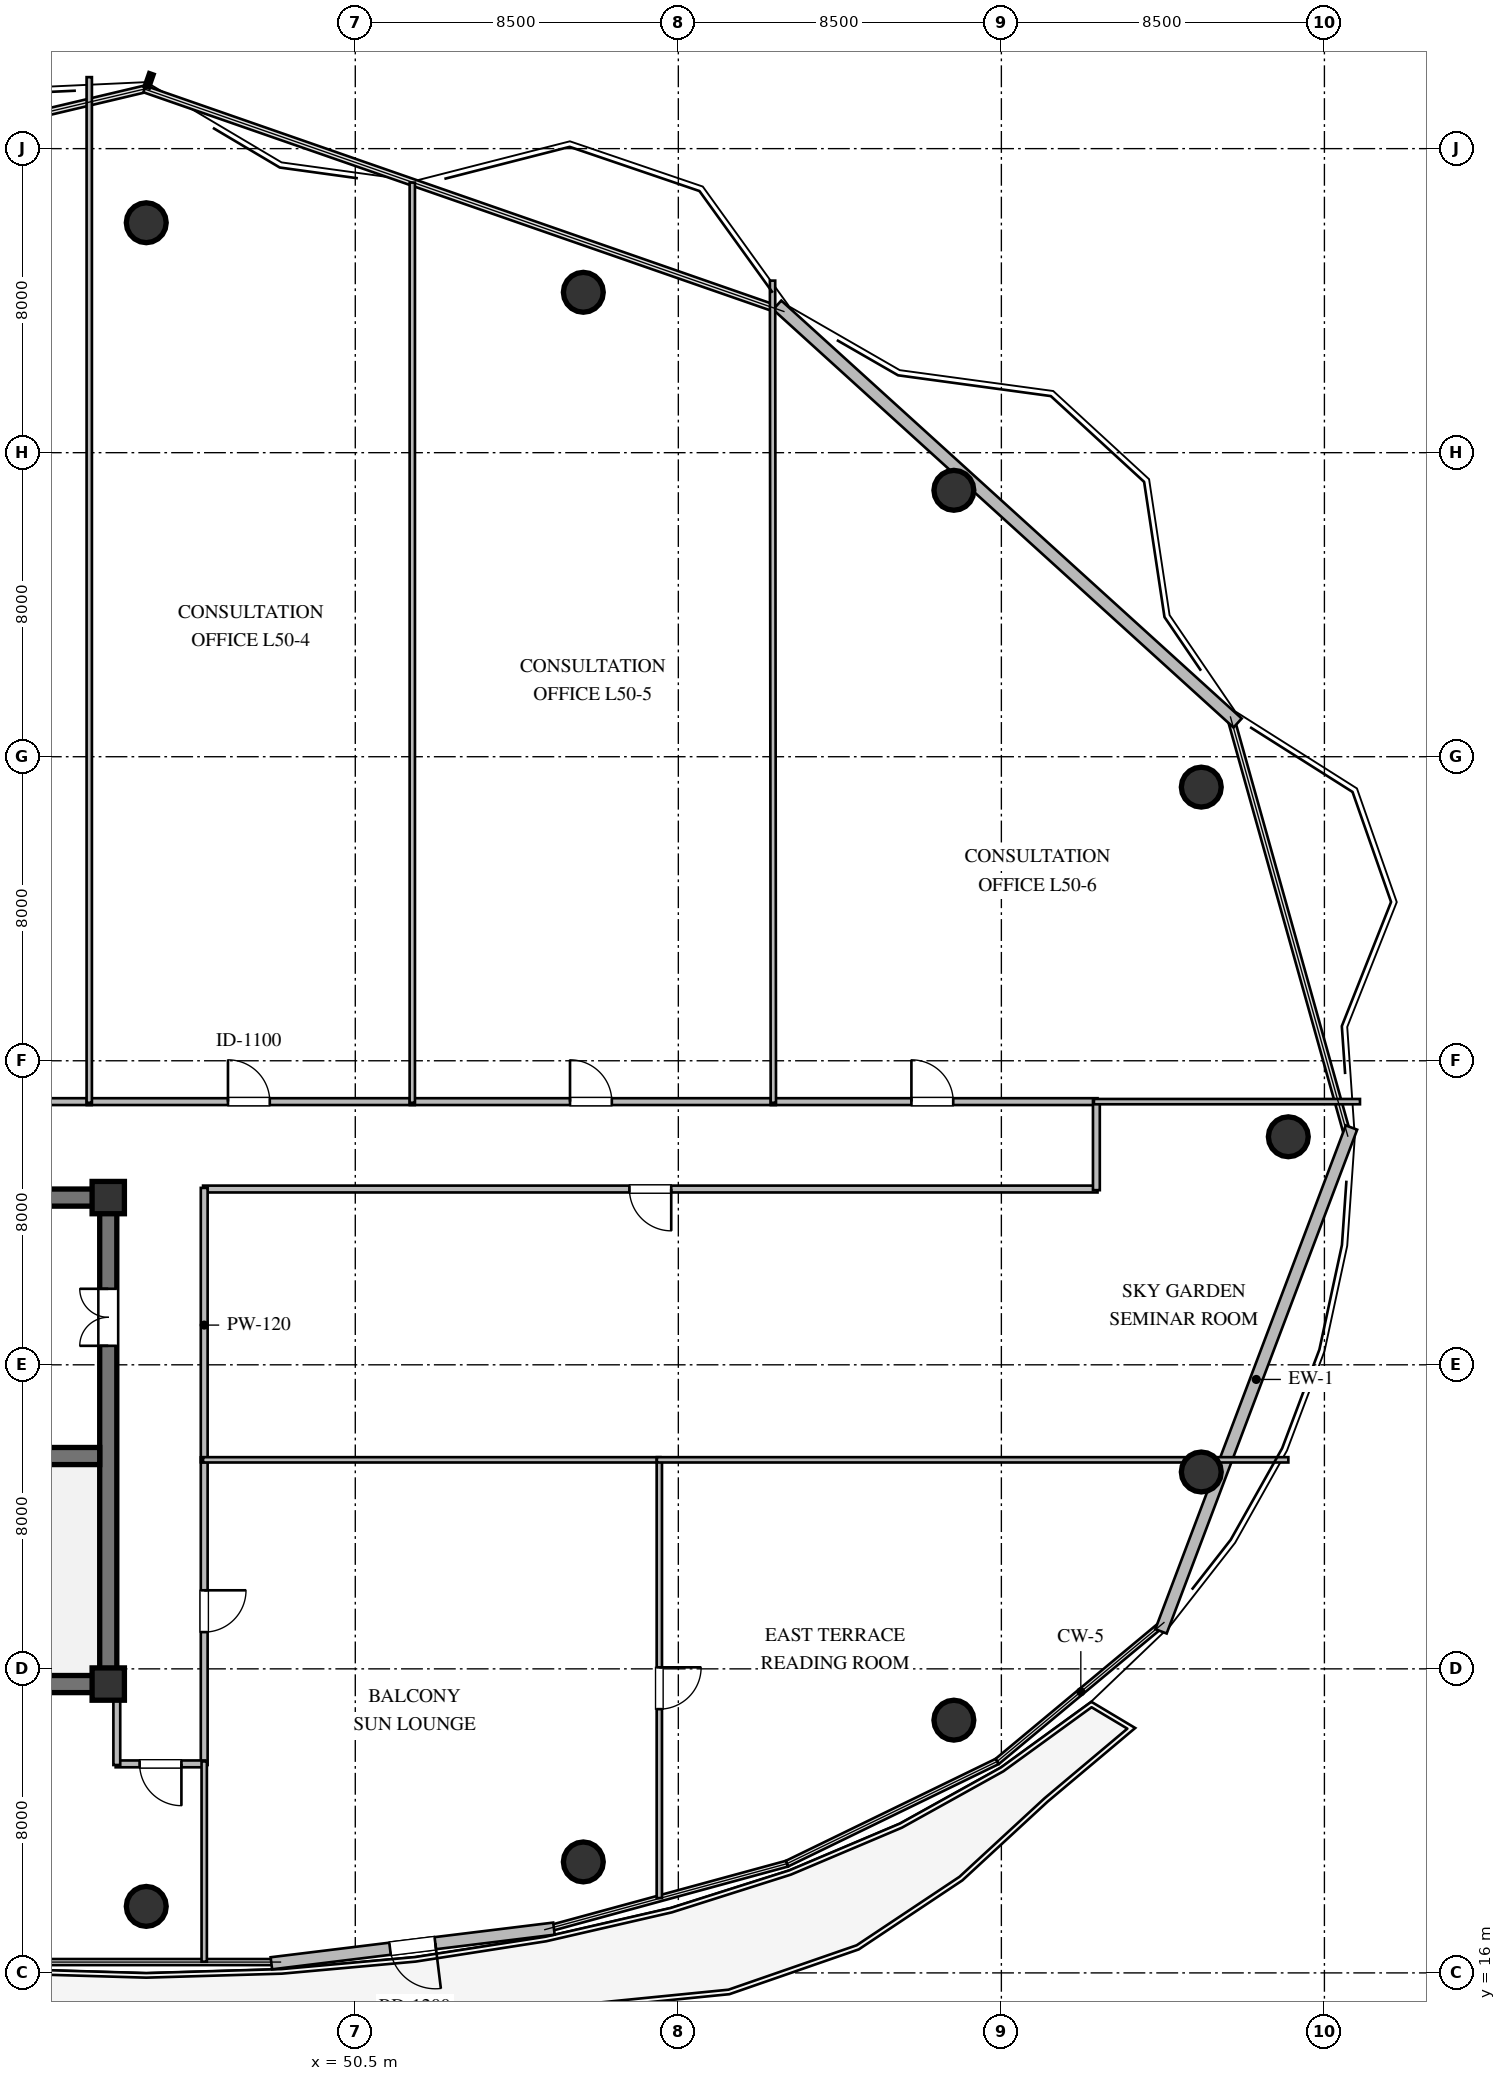
"""IFC4 building model, lengths in metres.
Left out: names, types, materials, properties, quantities, classifications, styles, units other than length and angle.
Written with IfcOpenShell. Run it as: python <this file> out.ifc"""

import sys

from ifc_helpers import new_model, si_unit, direction, frame, frame_2d, origin, origin_2d, place, context, subcontext, project, spatial, rectangle, circle, extrude, element, fill, save


model = new_model("IFC4")
c1 = context("Model", 3, precision=1e-05, world=origin(), true_north=direction((0.0, 1.0)))
c2 = subcontext(c1, "Body", "Model", "MODEL_VIEW")
j1 = project(units=[si_unit("LENGTHUNIT", "METRE"), si_unit("PLANEANGLEUNIT", "RADIAN")], contexts=[c1])
p1 = place(None, origin())
s1 = spatial("IfcSite", under=j1, at=p1, CompositionType="ELEMENT")
p2 = place(p1, origin())
s2 = spatial("IfcBuilding", under=s1, at=p2, CompositionType="ELEMENT")
p3 = place(p2, frame((0.0, 0.0, 190.8)))
s3 = spatial("IfcBuildingStorey", under=s2, at=p3, CompositionType="ELEMENT", Elevation=190.8)
for number, where, z_axis, x_axis in (
    (1, (21.775, 23.6, 0.0), (0.0, 0.0, 1.0), (1.0, 0.0, 0.0)),
    (2, (21.775, 36.4, 0.0), (0.0, 0.0, 1.0), (1.0, 0.0, 0.0)),
):
    element("IfcWall", number, at=place(p3, frame(where, z_axis=z_axis, x_axis=x_axis)), inside=s3, PredefinedType="SHEAR", context=c2, shape_type="SweptSolid", body=[
        extrude(rectangle(XDim=22.45, YDim=0.45, at=frame_2d((11.225, 0.0))), origin(), (0.0, 0.0, 1.0), 4.56),
    ])
p4 = place(p3, frame((44.0, 23.825, 0.0), z_axis=(0.0, 0.0, 1.0), x_axis=(0.0, 1.0, 0.0)))
e3 = element("IfcWall", 3, at=p4, inside=s3, PredefinedType="SHEAR", context=c2, shape_type="SweptSolid", body=[
    extrude(rectangle(XDim=12.35, YDim=0.45, at=frame_2d((6.175, 0.0))), origin(), (0.0, 0.0, 1.0), 4.56),
])
p5 = place(p4, frame((8.675, 0.0, 0.0)))
e4 = element("IfcOpeningElement", 4, at=p5, cuts=e3, PredefinedType="OPENING", context=c2, shape_type="SweptSolid", body=[
    extrude(rectangle(XDim=1.5, YDim=2.15, at=frame_2d((0.75, 1.075))), frame((0.0, 0.235, 0.0), z_axis=(0.0, -1.0, 0.0), x_axis=(1.0, 0.0, 0.0)), (0.0, 0.0, 1.0), 0.47),
])
p6 = place(p3, frame((22.225, 29.6, 0.0), z_axis=(0.0, 0.0, 1.0), x_axis=(1.0, 0.0, 0.0)))
e5 = element("IfcWall", 5, at=p6, inside=s3, PredefinedType="SHEAR", context=c2, shape_type="SweptSolid", body=[
    extrude(rectangle(XDim=21.55, YDim=0.45, at=frame_2d((10.775, 0.0))), origin(), (0.0, 0.0, 1.0), 4.56),
])
p7 = place(p6, frame((12.225, 0.0, 0.0)))
e6 = element("IfcOpeningElement", 6, at=p7, cuts=e5, PredefinedType="OPENING", context=c2, shape_type="SweptSolid", body=[
    extrude(rectangle(XDim=1.15, YDim=2.1, at=frame_2d((0.575, 1.05))), frame((0.0, 0.235, 0.0), z_axis=(0.0, -1.0, 0.0), x_axis=(1.0, 0.0, 0.0)), (0.0, 0.0, 1.0), 0.47),
])
for number, where, z_axis, x_axis in (
    (7, (44.0, 23.6, 0.0), (0.0, 0.0, 1.0), (1.0, 0.0, 0.0)),
    (8, (44.0, 36.4, 0.0), (0.0, 0.0, 1.0), (1.0, 0.0, 0.0)),
):
    element("IfcColumn", number, at=place(p3, frame(where, z_axis=z_axis, x_axis=x_axis)), inside=s3, PredefinedType="COLUMN", context=c2, shape_type="SweptSolid", body=[
        extrude(rectangle(XDim=0.85, YDim=0.85, at=origin_2d()), origin(), (0.0, 0.0, 1.0), 4.8),
    ])
for number, where, z_axis, x_axis in (
    (9, (75.05, 38.0, 0.0), (0.0, 0.0, 1.0), (1.0, 0.0, 0.0)),
    (10, (72.76, 47.2, 0.0), (0.0, 0.0, 1.0), (1.0, 0.0, 0.0)),
    (11, (66.25, 55.01, 0.0), (0.0, 0.0, 1.0), (1.0, 0.0, 0.0)),
    (12, (56.5, 60.22, 0.0), (0.0, 0.0, 1.0), (1.0, 0.0, 0.0)),
    (13, (45.0, 62.05, 0.0), (0.0, 0.0, 1.0), (1.0, 0.0, 0.0)),
    (14, (45.0, 17.75, 0.0), (0.0, 0.0, 1.0), (1.0, 0.0, 0.0)),
    (15, (56.5, 18.92, 0.0), (0.0, 0.0, 1.0), (1.0, 0.0, 0.0)),
    (16, (66.25, 22.65, 0.0), (0.0, 0.0, 1.0), (1.0, 0.0, 0.0)),
    (17, (72.76, 29.18, 0.0), (0.0, 0.0, 1.0), (1.0, 0.0, 0.0)),
):
    element("IfcColumn", number, at=place(p3, frame(where, z_axis=z_axis, x_axis=x_axis)), inside=s3, PredefinedType="COLUMN", context=c2, shape_type="SweptSolid", body=[
        extrude(circle(Radius=0.525, at=origin_2d()), origin(), (0.0, 0.0, 1.0), 4.8),
    ])
p8 = place(p3, frame((76.712, 38.243, 0.0), z_axis=(0.0, 0.0, 1.0), x_axis=(-0.353659523244, -0.935374225441, 0.0)))
e18 = element("IfcWall", 18, at=p8, inside=s3, PredefinedType="STANDARD", context=c2, shape_type="SweptSolid", body=[
    extrude(rectangle(XDim=14.172, YDim=0.32, at=frame_2d((7.086, 0.0))), origin(), (0.0, 0.0, 1.0), 4.56),
])
p9 = place(p3, frame((55.727, 17.165, 0.0), z_axis=(0.0, 0.0, 1.0), x_axis=(-0.992559081031, -0.121763995755, 0.0)))
e19 = element("IfcWall", 19, at=p9, inside=s3, PredefinedType="STANDARD", context=c2, shape_type="SweptSolid", body=[
    extrude(rectangle(XDim=7.491, YDim=0.32, at=frame_2d((3.745, 0.0))), origin(), (0.0, 0.0, 1.0), 4.56),
])
p10 = place(p9, frame((3.145, 0.0, 0.0)))
e20 = element("IfcOpeningElement", 20, at=p10, cuts=e19, PredefinedType="OPENING", context=c2, shape_type="SweptSolid", body=[
    extrude(rectangle(XDim=1.2, YDim=2.15, at=frame_2d((0.6, 1.075))), frame((0.0, 0.17, 0.0), z_axis=(0.0, -1.0, 0.0), x_axis=(1.0, 0.0, 0.0)), (0.0, 0.0, 1.0), 0.34),
])
p11 = place(p3, frame((61.602, 59.884, 0.0), z_axis=(0.0, 0.0, 1.0), x_axis=(0.740416582554, -0.672148260638, 0.0)))
e21 = element("IfcWall", 21, at=p11, inside=s3, PredefinedType="STANDARD", context=c2, shape_type="SweptSolid", body=[
    extrude(rectangle(XDim=16.361, YDim=0.32, at=frame_2d((8.181, 0.0))), origin(), (0.0, 0.0, 1.0), 4.56),
])
p12 = place(p3, frame((34.935, 38.925, 0.0), z_axis=(0.0, 0.0, 1.0), x_axis=(1.0, 0.0, 0.0)))
e22 = element("IfcWall", 22, at=p12, inside=s3, PredefinedType="PARTITIONING", context=c2, shape_type="SweptSolid", body=[
    extrude(rectangle(XDim=8.63, YDim=0.18, at=frame_2d((4.315, 0.0))), origin(), (0.0, 0.0, 1.0), 4.56),
])
p13 = place(p12, frame((3.715, 0.0, 0.0)))
e23 = element("IfcOpeningElement", 23, at=p13, cuts=e22, PredefinedType="OPENING", context=c2, shape_type="SweptSolid", body=[
    extrude(rectangle(XDim=1.1, YDim=2.1, at=frame_2d((0.55, 1.05))), frame((0.0, 0.1, 0.0), z_axis=(0.0, -1.0, 0.0), x_axis=(1.0, 0.0, 0.0)), (0.0, 0.0, 1.0), 0.2),
])
p14 = place(p3, frame((43.435, 38.925, 0.0), z_axis=(0.0, 0.0, 1.0), x_axis=(1.0, 0.0, 0.0)))
e24 = element("IfcWall", 24, at=p14, inside=s3, PredefinedType="PARTITIONING", context=c2, shape_type="SweptSolid", body=[
    extrude(rectangle(XDim=8.63, YDim=0.18, at=frame_2d((4.315, 0.0))), origin(), (0.0, 0.0, 1.0), 4.56),
])
p15 = place(p14, frame((3.715, 0.0, 0.0)))
e25 = element("IfcOpeningElement", 25, at=p15, cuts=e24, PredefinedType="OPENING", context=c2, shape_type="SweptSolid", body=[
    extrude(rectangle(XDim=1.1, YDim=2.1, at=frame_2d((0.55, 1.05))), frame((0.0, 0.1, 0.0), z_axis=(0.0, -1.0, 0.0), x_axis=(1.0, 0.0, 0.0)), (0.0, 0.0, 1.0), 0.2),
])
p16 = place(p3, frame((51.935, 38.925, 0.0), z_axis=(0.0, 0.0, 1.0), x_axis=(1.0, 0.0, 0.0)))
e26 = element("IfcWall", 26, at=p16, inside=s3, PredefinedType="PARTITIONING", context=c2, shape_type="SweptSolid", body=[
    extrude(rectangle(XDim=9.63, YDim=0.18, at=frame_2d((4.815, 0.0))), origin(), (0.0, 0.0, 1.0), 4.56),
])
p17 = place(p16, frame((4.215, 0.0, 0.0)))
e27 = element("IfcOpeningElement", 27, at=p17, cuts=e26, PredefinedType="OPENING", context=c2, shape_type="SweptSolid", body=[
    extrude(rectangle(XDim=1.1, YDim=2.1, at=frame_2d((0.55, 1.05))), frame((0.0, 0.1, 0.0), z_axis=(0.0, -1.0, 0.0), x_axis=(1.0, 0.0, 0.0)), (0.0, 0.0, 1.0), 0.2),
])
p18 = place(p3, frame((61.435, 38.925, 0.0), z_axis=(0.0, 0.0, 1.0), x_axis=(1.0, 0.0, 0.0)))
e28 = element("IfcWall", 28, at=p18, inside=s3, PredefinedType="PARTITIONING", context=c2, shape_type="SweptSolid", body=[
    extrude(rectangle(XDim=8.595, YDim=0.18, at=frame_2d((4.297, 0.0))), origin(), (0.0, 0.0, 1.0), 4.56),
])
p19 = place(p18, frame((3.698, 0.0, 0.0)))
e29 = element("IfcOpeningElement", 29, at=p19, cuts=e28, PredefinedType="OPENING", context=c2, shape_type="SweptSolid", body=[
    extrude(rectangle(XDim=1.1, YDim=2.1, at=frame_2d((0.55, 1.05))), frame((0.0, 0.1, 0.0), z_axis=(0.0, -1.0, 0.0), x_axis=(1.0, 0.0, 0.0)), (0.0, 0.0, 1.0), 0.2),
])
p20 = place(p3, frame((46.525, 29.565, 0.0), z_axis=(0.0, 0.0, 1.0), x_axis=(0.0, -1.0, 0.0)))
e30 = element("IfcWall", 30, at=p20, inside=s3, PredefinedType="PARTITIONING", context=c2, shape_type="SweptSolid", body=[
    extrude(rectangle(XDim=8.095, YDim=0.18, at=frame_2d((4.047, 0.0))), origin(), (0.0, 0.0, 1.0), 4.56),
])
p21 = place(p20, frame((3.498, 0.0, 0.0)))
e31 = element("IfcOpeningElement", 31, at=p21, cuts=e30, PredefinedType="OPENING", context=c2, shape_type="SweptSolid", body=[
    extrude(rectangle(XDim=1.1, YDim=2.1, at=frame_2d((0.55, 1.05))), frame((0.0, 0.1, 0.0), z_axis=(0.0, -1.0, 0.0), x_axis=(1.0, 0.0, 0.0)), (0.0, 0.0, 1.0), 0.2),
])
p22 = place(p3, frame((70.03, 36.625, 0.0), z_axis=(0.0, 0.0, 1.0), x_axis=(-1.0, 0.0, 0.0)))
e32 = element("IfcWall", 32, at=p22, inside=s3, PredefinedType="PARTITIONING", context=c2, shape_type="SweptSolid", body=[
    extrude(rectangle(XDim=23.535, YDim=0.18, at=frame_2d((11.768, 0.0))), origin(), (0.0, 0.0, 1.0), 4.006),
])
p23 = place(p22, frame((11.217, 0.0, 0.0)))
e33 = element("IfcOpeningElement", 33, at=p23, cuts=e32, PredefinedType="OPENING", context=c2, shape_type="SweptSolid", body=[
    extrude(rectangle(XDim=1.1, YDim=2.1, at=frame_2d((0.55, 1.05))), frame((0.0, 0.1, 0.0), z_axis=(0.0, -1.0, 0.0), x_axis=(1.0, 0.0, 0.0)), (0.0, 0.0, 1.0), 0.2),
])
p24 = place(p3, frame((46.525, 36.655, 0.0), z_axis=(0.0, 0.0, 1.0), x_axis=(0.0, -1.0, 0.0)))
e34 = element("IfcWall", 34, at=p24, inside=s3, PredefinedType="PARTITIONING", context=c2, shape_type="SweptSolid", body=[
    extrude(rectangle(XDim=7.22, YDim=0.18, at=frame_2d((3.61, 0.0))), origin(), (0.0, 0.0, 1.0), 4.56),
])
p25 = place(p3, frame((70.0, 38.955, 0.0), z_axis=(0.0, 0.0, 1.0), x_axis=(0.0, -1.0, 0.0)))
e35 = element("IfcWall", 35, at=p25, inside=s3, PredefinedType="PARTITIONING", context=c2, shape_type="SweptSolid", body=[
    extrude(rectangle(XDim=2.36, YDim=0.18, at=frame_2d((1.18, 0.0))), origin(), (0.0, 0.0, 1.0), 4.56),
])
p26 = place(p3, frame((46.555, 21.5, 0.0), z_axis=(0.0, 0.0, 1.0), x_axis=(-1.0, 0.0, 0.0)))
e36 = element("IfcWall", 36, at=p26, inside=s3, PredefinedType="PARTITIONING", context=c2, shape_type="SweptSolid", body=[
    extrude(rectangle(XDim=2.36, YDim=0.18, at=frame_2d((1.18, 0.0))), origin(), (0.0, 0.0, 1.0), 4.56),
])
p27 = place(p26, frame((0.63, 0.0, 0.0)))
e37 = element("IfcOpeningElement", 37, at=p27, cuts=e36, PredefinedType="OPENING", context=c2, shape_type="SweptSolid", body=[
    extrude(rectangle(XDim=1.1, YDim=2.1, at=frame_2d((0.55, 1.05))), frame((0.0, 0.1, 0.0), z_axis=(0.0, -1.0, 0.0), x_axis=(1.0, 0.0, 0.0)), (0.0, 0.0, 1.0), 0.2),
])
p28 = place(p3, frame((44.225, 21.47, 0.0), z_axis=(0.0, 0.0, 1.0), x_axis=(0.0, 1.0, 0.0)))
e38 = element("IfcWall", 38, at=p28, inside=s3, PredefinedType="PARTITIONING", context=c2, shape_type="SweptSolid", body=[
    extrude(rectangle(XDim=2.12, YDim=0.18, at=frame_2d((1.06, 0.0))), origin(), (0.0, 0.0, 1.0), 3.7),
])
p29 = place(p3, frame((43.5, 65.881, 0.0), z_axis=(0.0, 0.0, 1.0), x_axis=(0.0, -1.0, 0.0)))
e39 = element("IfcWall", 39, at=p29, inside=s3, PredefinedType="PARTITIONING", context=c2, shape_type="SweptSolid", body=[
    extrude(rectangle(XDim=26.986, YDim=0.14, at=frame_2d((13.493, 0.0))), origin(), (0.0, 0.0, 1.0), 4.006),
])
p30 = place(p3, frame((52.0, 63.107, 0.0), z_axis=(0.0, 0.0, 1.0), x_axis=(0.0, -1.0, 0.0)))
e40 = element("IfcWall", 40, at=p30, inside=s3, PredefinedType="PARTITIONING", context=c2, shape_type="SweptSolid", body=[
    extrude(rectangle(XDim=24.212, YDim=0.14, at=frame_2d((12.106, 0.0))), origin(), (0.0, 0.0, 1.0), 4.56),
])
p31 = place(p3, frame((61.479, 60.527, 0.0), z_axis=(0.0, 0.0, 1.0), x_axis=(0.000970599396, -0.999999528968, 0.0)))
e41 = element("IfcWall", 41, at=p31, inside=s3, PredefinedType="PARTITIONING", context=c2, shape_type="SweptSolid", body=[
    extrude(rectangle(XDim=21.632, YDim=0.14, at=frame_2d((10.816, 0.0))), origin(), (0.0, 0.0, 1.0), 4.56),
])
p32 = place(p3, frame((76.936, 38.925, 0.0), z_axis=(0.0, 0.0, 1.0), x_axis=(-1.0, 0.0, 0.0)))
e42 = element("IfcWall", 42, at=p32, inside=s3, PredefinedType="PARTITIONING", context=c2, shape_type="SweptSolid", body=[
    extrude(rectangle(XDim=7.001, YDim=0.14, at=frame_2d((3.5, 0.0))), origin(), (0.0, 0.0, 1.0), 4.56),
])
p33 = place(p3, frame((46.495, 29.5, 0.0), z_axis=(0.0, 0.0, 1.0), x_axis=(1.0, 0.0, 0.0)))
e43 = element("IfcWall", 43, at=p33, inside=s3, PredefinedType="PARTITIONING", context=c2, shape_type="SweptSolid", body=[
    extrude(rectangle(XDim=12.035, YDim=0.14, at=frame_2d((6.018, 0.0))), origin(), (0.0, 0.0, 1.0), 4.56),
])
p34 = place(p3, frame((58.5, 29.53, 0.0), z_axis=(0.0, 0.0, 1.0), x_axis=(0.0, -1.0, 0.0)))
e44 = element("IfcWall", 44, at=p34, inside=s3, PredefinedType="PARTITIONING", context=c2, shape_type="SweptSolid", body=[
    extrude(rectangle(XDim=11.561, YDim=0.14, at=frame_2d((5.781, 0.0))), origin(), (0.0, 0.0, 1.0), 4.56),
])
p35 = place(p34, frame((5.49, 0.0, 0.0)))
e45 = element("IfcOpeningElement", 45, at=p35, cuts=e44, PredefinedType="OPENING", context=c2, shape_type="SweptSolid", body=[
    extrude(rectangle(XDim=1.1, YDim=2.1, at=frame_2d((0.55, 1.05))), frame((0.0, 0.08, 0.0), z_axis=(0.0, -1.0, 0.0), x_axis=(1.0, 0.0, 0.0)), (0.0, 0.0, 1.0), 0.16),
])
p36 = place(p3, frame((46.525, 16.295, 0.0), z_axis=(0.0, 0.0, 1.0), x_axis=(0.0, 1.0, 0.0)))
e46 = element("IfcWall", 46, at=p36, inside=s3, PredefinedType="PARTITIONING", context=c2, shape_type="SweptSolid", body=[
    extrude(rectangle(XDim=5.27, YDim=0.14, at=frame_2d((2.635, 0.0))), origin(), (0.0, 0.0, 1.0), 4.56),
])
p37 = place(p3, frame((75.051, 29.5, 0.0), z_axis=(0.0, 0.0, 1.0), x_axis=(-1.0, 0.0, 0.0)))
e47 = element("IfcWall", 47, at=p37, inside=s3, PredefinedType="PARTITIONING", context=c2, shape_type="SweptSolid", body=[
    extrude(rectangle(XDim=16.616, YDim=0.14, at=frame_2d((8.308, 0.0))), origin(), (0.0, 0.0, 1.0), 4.006),
])
p38 = place(p10, origin())
e48 = element("IfcDoor", 48, at=p38, inside=s3, OperationType="SINGLE_SWING_LEFT", PredefinedType="DOOR", context=c2, shape_type="SweptSolid", body=[
    extrude(rectangle(XDim=1.2, YDim=2.15, at=frame_2d((0.6, 1.075))), frame((0.0, 0.025, 0.0), z_axis=(0.0, -1.0, 0.0), x_axis=(1.0, 0.0, 0.0)), (0.0, 0.0, 1.0), 0.05),
])
fill(e20, e48)
p39 = place(p5, origin())
e49 = element("IfcDoor", 49, at=p39, inside=s3, OperationType="DOUBLE_DOOR_SINGLE_SWING", PredefinedType="DOOR", context=c2, shape_type="SweptSolid", body=[
    extrude(rectangle(XDim=1.5, YDim=2.15, at=frame_2d((0.75, 1.075))), frame((0.0, 0.025, 0.0), z_axis=(0.0, -1.0, 0.0), x_axis=(1.0, 0.0, 0.0)), (0.0, 0.0, 1.0), 0.05),
])
fill(e4, e49)
p40 = place(p15, origin())
e50 = element("IfcDoor", 50, at=p40, inside=s3, OperationType="SINGLE_SWING_LEFT", PredefinedType="DOOR", context=c2, shape_type="SweptSolid", body=[
    extrude(rectangle(XDim=1.1, YDim=2.1, at=frame_2d((0.55, 1.05))), frame((0.0, 0.025, 0.0), z_axis=(0.0, -1.0, 0.0), x_axis=(1.0, 0.0, 0.0)), (0.0, 0.0, 1.0), 0.05),
])
fill(e25, e50)
p41 = place(p17, origin())
e51 = element("IfcDoor", 51, at=p41, inside=s3, OperationType="SINGLE_SWING_LEFT", PredefinedType="DOOR", context=c2, shape_type="SweptSolid", body=[
    extrude(rectangle(XDim=1.1, YDim=2.1, at=frame_2d((0.55, 1.05))), frame((0.0, 0.025, 0.0), z_axis=(0.0, -1.0, 0.0), x_axis=(1.0, 0.0, 0.0)), (0.0, 0.0, 1.0), 0.05),
])
fill(e27, e51)
p42 = place(p19, origin())
e52 = element("IfcDoor", 52, at=p42, inside=s3, OperationType="SINGLE_SWING_LEFT", PredefinedType="DOOR", context=c2, shape_type="SweptSolid", body=[
    extrude(rectangle(XDim=1.1, YDim=2.1, at=frame_2d((0.55, 1.05))), frame((0.0, 0.025, 0.0), z_axis=(0.0, -1.0, 0.0), x_axis=(1.0, 0.0, 0.0)), (0.0, 0.0, 1.0), 0.05),
])
fill(e29, e52)
p43 = place(p21, origin())
e53 = element("IfcDoor", 53, at=p43, inside=s3, OperationType="SINGLE_SWING_LEFT", PredefinedType="DOOR", context=c2, shape_type="SweptSolid", body=[
    extrude(rectangle(XDim=1.1, YDim=2.1, at=frame_2d((0.55, 1.05))), frame((0.0, 0.025, 0.0), z_axis=(0.0, -1.0, 0.0), x_axis=(1.0, 0.0, 0.0)), (0.0, 0.0, 1.0), 0.05),
])
fill(e31, e53)
p44 = place(p23, origin())
e54 = element("IfcDoor", 54, at=p44, inside=s3, OperationType="SINGLE_SWING_LEFT", PredefinedType="DOOR", context=c2, shape_type="SweptSolid", body=[
    extrude(rectangle(XDim=1.1, YDim=2.1, at=frame_2d((0.55, 1.05))), frame((0.0, 0.025, 0.0), z_axis=(0.0, -1.0, 0.0), x_axis=(1.0, 0.0, 0.0)), (0.0, 0.0, 1.0), 0.05),
])
fill(e33, e54)
p45 = place(p27, origin())
e55 = element("IfcDoor", 55, at=p45, inside=s3, OperationType="SINGLE_SWING_LEFT", PredefinedType="DOOR", context=c2, shape_type="SweptSolid", body=[
    extrude(rectangle(XDim=1.1, YDim=2.1, at=frame_2d((0.55, 1.05))), frame((0.0, 0.025, 0.0), z_axis=(0.0, -1.0, 0.0), x_axis=(1.0, 0.0, 0.0)), (0.0, 0.0, 1.0), 0.05),
])
fill(e37, e55)
p46 = place(p35, origin())
e56 = element("IfcDoor", 56, at=p46, inside=s3, OperationType="SINGLE_SWING_LEFT", PredefinedType="DOOR", context=c2, shape_type="SweptSolid", body=[
    extrude(rectangle(XDim=1.1, YDim=2.1, at=frame_2d((0.55, 1.05))), frame((0.0, 0.025, 0.0), z_axis=(0.0, -1.0, 0.0), x_axis=(1.0, 0.0, 0.0)), (0.0, 0.0, 1.0), 0.05),
])
fill(e45, e56)
save(model, sys.argv[1])
